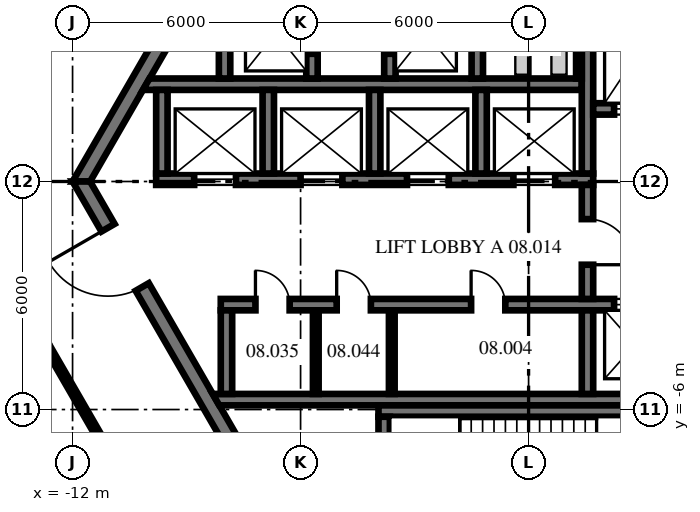
"""IFC4 building model, lengths in metres.
Left out: names, types, materials, properties, quantities, classifications, styles, units other than length and angle.
Written with IfcOpenShell. Run it as: python <this file> out.ifc"""

import sys

from ifc_helpers import new_model, si_unit, direction, frame, frame_2d, origin, place, context, subcontext, project, spatial, polyline, rectangle, outline, extrude, source, transform, mapped, element, fill, save


model = new_model("IFC4")
c1 = context("Model", 3, precision=1e-05, world=origin(), true_north=direction((0.0, 1.0)))
c2 = subcontext(c1, "Body", "Model", "MODEL_VIEW")
j1 = project(units=[si_unit("LENGTHUNIT", "METRE"), si_unit("PLANEANGLEUNIT", "RADIAN")], contexts=[c1])
p1 = place(None, origin())
s1 = spatial("IfcSite", under=j1, at=p1, CompositionType="ELEMENT")
p2 = place(p1, origin())
s2 = spatial("IfcBuilding", under=s1, at=p2, CompositionType="ELEMENT")
p3 = place(p2, frame((0.0, 0.0, 37.5)))
s3 = spatial("IfcBuildingStorey", under=s2, at=p3, CompositionType="ELEMENT", Elevation=37.5)
m1 = source(origin(), c2, "Body", "SweptSolid", [
    extrude(outline(polyline([(-0.115, -0.2), (11.885, -0.2), (11.654, 0.2), (0.115, 0.2), (-0.115, -0.2)])), origin(), (0.0, 0.0, 1.0), 4.1),
])
p4 = place(p3, frame((-5.885, 10.192, 0.0), z_axis=(0.0, 0.0, 1.0), x_axis=(-0.499996592174, -0.866027371285, 0.0)))
e1 = element("IfcWall", 1, at=p4, inside=s3, PredefinedType="SHEAR", context=c2, shape_type="MappedRepresentation", body=[
    mapped(m1, transform((0.0, 0.0, 0.0), scale=1.0)),
])
p5 = place(p4, frame((3.185, 0.0, 0.0)))
e2 = element("IfcOpeningElement", 2, at=p5, cuts=e1, PredefinedType="OPENING", context=c2, shape_type="SweptSolid", body=[
    extrude(rectangle(XDim=1.2, YDim=2.1, at=frame_2d((0.6, 1.05))), frame((0.0, 0.21, 0.0), z_axis=(0.0, -1.0, 0.0), x_axis=(1.0, 0.0, 0.0)), (0.0, 0.0, 1.0), 0.42),
])
p6 = place(p3, frame((-11.769, 0.0, 0.0), z_axis=(0.0, 0.0, 1.0), x_axis=(0.499996592174, -0.866027371285, 0.0)))
e3 = element("IfcWall", 3, at=p6, inside=s3, PredefinedType="SHEAR", context=c2, shape_type="MappedRepresentation", body=[
    mapped(m1, transform((0.0, 0.0, 0.0), scale=1.0)),
])
p7 = place(p6, frame((1.405, 0.0, 0.0)))
e4 = element("IfcOpeningElement", 4, at=p7, cuts=e3, PredefinedType="OPENING", context=c2, shape_type="SweptSolid", body=[
    extrude(rectangle(XDim=1.8, YDim=2.1, at=frame_2d((0.9, 1.05))), frame((0.0, 0.21, 0.0), z_axis=(0.0, -1.0, 0.0), x_axis=(1.0, 0.0, 0.0)), (0.0, 0.0, 1.0), 0.42),
])
p8 = place(p6, frame((7.915, 0.0, 0.0)))
e5 = element("IfcOpeningElement", 5, at=p8, cuts=e3, PredefinedType="OPENING", context=c2, shape_type="SweptSolid", body=[
    extrude(rectangle(XDim=1.2, YDim=2.1, at=frame_2d((0.6, 1.05))), frame((0.0, 0.21, 0.0), z_axis=(0.0, -1.0, 0.0), x_axis=(1.0, 0.0, 0.0)), (0.0, 0.0, 1.0), 0.42),
])
m2 = source(origin(), c2, "Body", "SweptSolid", [
    extrude(rectangle(XDim=11.5, YDim=0.3, at=frame_2d((5.75, 0.0))), origin(), (0.0, 0.0, 1.0), 4.1),
])
p9 = place(p3, frame((-9.8, 0.06, 0.0), z_axis=(0.0, 0.0, 1.0), x_axis=(1.0, 0.0, 0.0)))
e6 = element("IfcWall", 6, at=p9, inside=s3, PredefinedType="SHEAR", context=c2, shape_type="MappedRepresentation", body=[
    mapped(m2, transform((0.0, 0.0, 0.0), scale=1.0)),
])
p10 = place(p9, frame((1.0, 0.0, 0.0)))
e7 = element("IfcOpeningElement", 7, at=p10, cuts=e6, PredefinedType="OPENING", context=c2, shape_type="SweptSolid", body=[
    extrude(rectangle(XDim=1.1, YDim=2.1, at=frame_2d((0.55, 1.05))), frame((0.0, 0.16, 0.0), z_axis=(0.0, -1.0, 0.0), x_axis=(1.0, 0.0, 0.0)), (0.0, 0.0, 1.0), 0.32),
])
p11 = place(p9, frame((3.8, 0.0, 0.0)))
e8 = element("IfcOpeningElement", 8, at=p11, cuts=e6, PredefinedType="OPENING", context=c2, shape_type="SweptSolid", body=[
    extrude(rectangle(XDim=1.1, YDim=2.1, at=frame_2d((0.55, 1.05))), frame((0.0, 0.16, 0.0), z_axis=(0.0, -1.0, 0.0), x_axis=(1.0, 0.0, 0.0)), (0.0, 0.0, 1.0), 0.32),
])
p12 = place(p9, frame((6.6, 0.0, 0.0)))
e9 = element("IfcOpeningElement", 9, at=p12, cuts=e6, PredefinedType="OPENING", context=c2, shape_type="SweptSolid", body=[
    extrude(rectangle(XDim=1.1, YDim=2.1, at=frame_2d((0.55, 1.05))), frame((0.0, 0.16, 0.0), z_axis=(0.0, -1.0, 0.0), x_axis=(1.0, 0.0, 0.0)), (0.0, 0.0, 1.0), 0.32),
])
p13 = place(p9, frame((9.4, 0.0, 0.0)))
e10 = element("IfcOpeningElement", 10, at=p13, cuts=e6, PredefinedType="OPENING", context=c2, shape_type="SweptSolid", body=[
    extrude(rectangle(XDim=1.1, YDim=2.1, at=frame_2d((0.55, 1.05))), frame((0.0, 0.16, 0.0), z_axis=(0.0, -1.0, 0.0), x_axis=(1.0, 0.0, 0.0)), (0.0, 0.0, 1.0), 0.32),
])
m3 = source(origin(), c2, "Body", "SweptSolid", [
    extrude(outline(polyline([(11.2, -0.15), (-0.349, -0.15), (-0.176, 0.15), (11.2, 0.15), (11.2, -0.15)])), origin(), (0.0, 0.0, 1.0), 4.1),
])
p14 = place(p3, frame((-9.8, 2.56, 0.0), z_axis=(0.0, 0.0, 1.0), x_axis=(1.0, 0.0, 0.0)))
e11 = element("IfcWall", 11, at=p14, inside=s3, PredefinedType="SHEAR", context=c2, shape_type="MappedRepresentation", body=[
    mapped(m3, transform((0.0, 0.0, 0.0), scale=1.0)),
])
m4 = source(origin(), c2, "Body", "SweptSolid", [
    extrude(rectangle(XDim=4.45, YDim=0.3, at=frame_2d((2.225, 0.0))), origin(), (0.0, 0.0, 1.0), 4.1),
])
p15 = place(p3, frame((1.55, 0.21, 0.0), z_axis=(0.0, 0.0, 1.0), x_axis=(0.0, 1.0, 0.0)))
e12 = element("IfcWall", 12, at=p15, inside=s3, PredefinedType="SHEAR", context=c2, shape_type="MappedRepresentation", body=[
    mapped(m4, transform((0.0, 0.0, 0.0), scale=1.0)),
])
m5 = source(origin(), c2, "Body", "SweptSolid", [
    extrude(rectangle(XDim=3.0, YDim=0.3, at=frame_2d((1.5, 0.0))), origin(), (0.0, 0.0, 1.0), 4.1),
])
p16 = place(p3, frame((1.7, 1.91, 0.0), z_axis=(0.0, 0.0, 1.0), x_axis=(1.0, 0.0, 0.0)))
e13 = element("IfcWall", 13, at=p16, inside=s3, PredefinedType="SHEAR", context=c2, shape_type="MappedRepresentation", body=[
    mapped(m5, transform((0.0, 0.0, 0.0), scale=1.0)),
])
p17 = place(p16, frame((0.55, 0.0, 0.0)))
e14 = element("IfcOpeningElement", 14, at=p17, cuts=e13, PredefinedType="OPENING", context=c2, shape_type="SweptSolid", body=[
    extrude(rectangle(XDim=1.1, YDim=2.1, at=frame_2d((0.55, 1.05))), frame((0.0, 0.16, 0.0), z_axis=(0.0, -1.0, 0.0), x_axis=(1.0, 0.0, 0.0)), (0.0, 0.0, 1.0), 0.32),
])
m6 = source(origin(), c2, "Body", "SweptSolid", [
    extrude(rectangle(XDim=12.8, YDim=0.3, at=frame_2d((6.4, 0.0))), origin(), (0.0, 0.0, 1.0), 4.1),
])
p18 = place(p3, frame((-8.1, -3.24, 0.0), z_axis=(0.0, 0.0, 1.0), x_axis=(1.0, 0.0, 0.0)))
e15 = element("IfcWall", 15, at=p18, inside=s3, PredefinedType="SHEAR", context=c2, shape_type="MappedRepresentation", body=[
    mapped(m6, transform((0.0, 0.0, 0.0), scale=1.0)),
])
p19 = place(p18, frame((0.913, 0.0, 0.0)))
e16 = element("IfcOpeningElement", 16, at=p19, cuts=e15, PredefinedType="OPENING", context=c2, shape_type="SweptSolid", body=[
    extrude(rectangle(XDim=0.9, YDim=2.1, at=frame_2d((0.45, 1.05))), frame((0.0, 0.16, 0.0), z_axis=(0.0, -1.0, 0.0), x_axis=(1.0, 0.0, 0.0)), (0.0, 0.0, 1.0), 0.32),
])
p20 = place(p18, frame((3.05, 0.0, 0.0)))
e17 = element("IfcOpeningElement", 17, at=p20, cuts=e15, PredefinedType="OPENING", context=c2, shape_type="SweptSolid", body=[
    extrude(rectangle(XDim=0.9, YDim=2.1, at=frame_2d((0.45, 1.05))), frame((0.0, 0.16, 0.0), z_axis=(0.0, -1.0, 0.0), x_axis=(1.0, 0.0, 0.0)), (0.0, 0.0, 1.0), 0.32),
])
p21 = place(p18, frame((6.587, 0.0, 0.0)))
e18 = element("IfcOpeningElement", 18, at=p21, cuts=e15, PredefinedType="OPENING", context=c2, shape_type="SweptSolid", body=[
    extrude(rectangle(XDim=0.9, YDim=2.1, at=frame_2d((0.45, 1.05))), frame((0.0, 0.16, 0.0), z_axis=(0.0, -1.0, 0.0), x_axis=(1.0, 0.0, 0.0)), (0.0, 0.0, 1.0), 0.32),
])
p22 = place(p18, frame((10.35, 0.0, 0.0)))
e19 = element("IfcOpeningElement", 19, at=p22, cuts=e15, PredefinedType="OPENING", context=c2, shape_type="SweptSolid", body=[
    extrude(rectangle(XDim=1.1, YDim=2.1, at=frame_2d((0.55, 1.05))), frame((0.0, 0.16, 0.0), z_axis=(0.0, -1.0, 0.0), x_axis=(1.0, 0.0, 0.0)), (0.0, 0.0, 1.0), 0.32),
])
m7 = source(origin(), c2, "Body", "SweptSolid", [
    extrude(outline(polyline([(12.0, -0.15), (-0.04, -0.15), (-0.213, 0.15), (12.0, 0.15), (12.0, -0.15)])), origin(), (0.0, 0.0, 1.0), 4.1),
])
p23 = place(p3, frame((-8.1, -5.74, 0.0), z_axis=(0.0, 0.0, 1.0), x_axis=(1.0, 0.0, 0.0)))
e20 = element("IfcWall", 20, at=p23, inside=s3, PredefinedType="SHEAR", context=c2, shape_type="MappedRepresentation", body=[
    mapped(m7, transform((0.0, 0.0, 0.0), scale=1.0)),
])
m8 = source(origin(), c2, "Body", "SweptSolid", [
    extrude(rectangle(XDim=2.2, YDim=0.3, at=frame_2d((1.1, 0.0))), origin(), (0.0, 0.0, 1.0), 4.1),
])
p24 = place(p3, frame((-7.95, -5.59, 0.0), z_axis=(0.0, 0.0, 1.0), x_axis=(0.0, 1.0, 0.0)))
e21 = element("IfcWall", 21, at=p24, inside=s3, PredefinedType="SHEAR", context=c2, shape_type="MappedRepresentation", body=[
    mapped(m8, transform((0.0, 0.0, 0.0), scale=1.0)),
])
m9 = source(origin(), c2, "Body", "SweptSolid", [
    extrude(rectangle(XDim=2.2, YDim=0.3, at=frame_2d((1.1, 0.0))), origin(), (0.0, 0.0, 1.0), 4.1),
])
p25 = place(p3, frame((-9.65, 0.21, 0.0), z_axis=(0.0, 0.0, 1.0), x_axis=(0.0, 1.0, 0.0)))
e22 = element("IfcWall", 22, at=p25, inside=s3, PredefinedType="SHEAR", context=c2, shape_type="MappedRepresentation", body=[
    mapped(m9, transform((0.0, 0.0, 0.0), scale=1.0)),
])
p26 = place(p3, frame((1.55, -5.59, 0.0), z_axis=(0.0, 0.0, 1.0), x_axis=(0.0, 1.0, 0.0)))
e23 = element("IfcWall", 23, at=p26, inside=s3, PredefinedType="SHEAR", context=c2, shape_type="MappedRepresentation", body=[
    mapped(m8, transform((0.0, 0.0, 0.0), scale=1.0)),
])
p27 = place(p3, frame((1.55, -3.09, 0.0), z_axis=(0.0, 0.0, 1.0), x_axis=(0.0, 1.0, 0.0)))
e24 = element("IfcWall", 24, at=p27, inside=s3, PredefinedType="SHEAR", context=c2, shape_type="MappedRepresentation", body=[
    mapped(m5, transform((0.0, 0.0, 0.0), scale=1.0)),
])
p28 = place(p27, frame((0.9, 0.0, 0.0)))
e25 = element("IfcOpeningElement", 25, at=p28, cuts=e24, PredefinedType="OPENING", context=c2, shape_type="SweptSolid", body=[
    extrude(rectangle(XDim=1.2, YDim=2.1, at=frame_2d((0.6, 1.05))), frame((0.0, 0.16, 0.0), z_axis=(0.0, -1.0, 0.0), x_axis=(1.0, 0.0, 0.0)), (0.0, 0.0, 1.0), 0.32),
])
m10 = source(origin(), c2, "Body", "SweptSolid", [
    extrude(outline(polyline([(0.0, -0.15), (8.95, -0.15), (8.65, 0.15), (0.0, 0.15), (0.0, -0.15)])), origin(), (0.0, 0.0, 1.0), 4.1),
])
p29 = place(p3, frame((-3.95, -6.04, 0.0), z_axis=(0.0, 0.0, 1.0), x_axis=(1.0, 0.0, 0.0)))
e26 = element("IfcWall", 26, at=p29, inside=s3, PredefinedType="SHEAR", context=c2, shape_type="MappedRepresentation", body=[
    mapped(m10, transform((0.0, 0.0, 0.0), scale=1.0)),
])
m11 = source(origin(), c2, "Body", "SweptSolid", [
    extrude(outline(polyline([(3.8, -0.15), (-0.004, -0.15), (-0.004, 0.15), (3.8, 0.15), (3.8, -0.15)])), origin(), (0.0, 0.0, 1.0), 4.1),
])
p30 = place(p3, frame((-3.8, -9.99, 0.0), z_axis=(0.0, 0.0, 1.0), x_axis=(0.0, 1.0, 0.0)))
e27 = element("IfcWall", 27, at=p30, inside=s3, PredefinedType="SHEAR", context=c2, shape_type="MappedRepresentation", body=[
    mapped(m11, transform((0.0, 0.0, 0.0), scale=1.0)),
])
m12 = source(origin(), c2, "Body", "SweptSolid", [
    extrude(rectangle(XDim=2.4, YDim=0.3, at=frame_2d((1.2, 0.0))), origin(), (0.0, 0.0, 1.0), 4.1),
])
p31 = place(p3, frame((-8.0, 2.71, 0.0), z_axis=(0.0, 0.0, 1.0), x_axis=(0.0, 1.0, 0.0)))
e28 = element("IfcWall", 28, at=p31, inside=s3, PredefinedType="SHEAR", context=c2, shape_type="MappedRepresentation", body=[
    mapped(m12, transform((0.0, 0.0, 0.0), scale=1.0)),
])
p32 = place(p3, frame((-5.7, 2.71, 0.0), z_axis=(0.0, 0.0, 1.0), x_axis=(0.0, 1.0, 0.0)))
e29 = element("IfcWall", 29, at=p32, inside=s3, PredefinedType="SHEAR", context=c2, shape_type="MappedRepresentation", body=[
    mapped(m12, transform((0.0, 0.0, 0.0), scale=1.0)),
])
p33 = place(p32, frame((0.65, 0.0, 0.0)))
e30 = element("IfcOpeningElement", 30, at=p33, cuts=e29, PredefinedType="OPENING", context=c2, shape_type="SweptSolid", body=[
    extrude(rectangle(XDim=1.1, YDim=2.1, at=frame_2d((0.55, 1.05))), frame((0.0, 0.16, 0.0), z_axis=(0.0, -1.0, 0.0), x_axis=(1.0, 0.0, 0.0)), (0.0, 0.0, 1.0), 0.32),
])
p34 = place(p3, frame((-3.65, 2.71, 0.0), z_axis=(0.0, 0.0, 1.0), x_axis=(0.0, 1.0, 0.0)))
e31 = element("IfcWall", 31, at=p34, inside=s3, PredefinedType="SHEAR", context=c2, shape_type="MappedRepresentation", body=[
    mapped(m12, transform((0.0, 0.0, 0.0), scale=1.0)),
])
p35 = place(p34, frame((0.65, 0.0, 0.0)))
e32 = element("IfcOpeningElement", 32, at=p35, cuts=e31, PredefinedType="OPENING", context=c2, shape_type="SweptSolid", body=[
    extrude(rectangle(XDim=1.1, YDim=2.1, at=frame_2d((0.55, 1.05))), frame((0.0, 0.16, 0.0), z_axis=(0.0, -1.0, 0.0), x_axis=(1.0, 0.0, 0.0)), (0.0, 0.0, 1.0), 0.32),
])
p36 = place(p3, frame((-1.35, 2.71, 0.0), z_axis=(0.0, 0.0, 1.0), x_axis=(0.0, 1.0, 0.0)))
e33 = element("IfcWall", 33, at=p36, inside=s3, PredefinedType="SHEAR", context=c2, shape_type="MappedRepresentation", body=[
    mapped(m12, transform((0.0, 0.0, 0.0), scale=1.0)),
])
m13 = source(origin(), c2, "Body", "SweptSolid", [
    extrude(rectangle(XDim=3.18, YDim=0.15, at=frame_2d((1.59, 0.0))), origin(), (0.0, 0.0, 1.0), 4.1),
])
p37 = place(p3, frame((1.325, 2.71, 0.0), z_axis=(0.0, 0.0, 1.0), x_axis=(0.0, 1.0, 0.0)))
e34 = element("IfcWall", 34, at=p37, inside=s3, PredefinedType="PARTITIONING", context=c2, shape_type="MappedRepresentation", body=[
    mapped(m13, transform((0.0, 0.0, 0.0), scale=1.0)),
])
p38 = place(p37, frame((2.265, 0.0, 0.0)))
e35 = element("IfcOpeningElement", 35, at=p38, cuts=e34, PredefinedType="OPENING", context=c2, shape_type="SweptSolid", body=[
    extrude(rectangle(XDim=0.9, YDim=2.1, at=frame_2d((0.45, 1.05))), frame((0.0, 0.085, 0.0), z_axis=(0.0, -1.0, 0.0), x_axis=(1.0, 0.0, 0.0)), (0.0, 0.0, 1.0), 0.17),
])
for number, where, z_axis, x_axis in (
    (36, (-6.85, 0.21, 0.0), (0.0, 0.0, 1.0), (0.0, 1.0, 0.0)),
    (37, (-4.05, 0.21, 0.0), (0.0, 0.0, 1.0), (0.0, 1.0, 0.0)),
    (38, (-1.25, 0.21, 0.0), (0.0, 0.0, 1.0), (0.0, 1.0, 0.0)),
):
    element("IfcWall", number, at=place(p3, frame(where, z_axis=z_axis, x_axis=x_axis)), inside=s3, PredefinedType="SHEAR", context=c2, shape_type="MappedRepresentation", body=[
        mapped(m9, transform((0.0, 0.0, 0.0), scale=1.0)),
    ])
m14 = source(origin(), c2, "Body", "SweptSolid", [
    extrude(rectangle(XDim=2.2, YDim=0.15, at=frame_2d((1.1, 0.0))), origin(), (0.0, 0.0, 1.0), 4.1),
])
for number, where, z_axis, x_axis in (
    (39, (-5.6, -5.59, 0.0), (0.0, 0.0, 1.0), (0.0, 1.0, 0.0)),
    (40, (-3.6, -5.59, 0.0), (0.0, 0.0, 1.0), (0.0, 1.0, 0.0)),
):
    element("IfcWall", number, at=place(p3, frame(where, z_axis=z_axis, x_axis=x_axis)), inside=s3, PredefinedType="PARTITIONING", context=c2, shape_type="MappedRepresentation", body=[
        mapped(m14, transform((0.0, 0.0, 0.0), scale=1.0)),
    ])
p39 = place(p3, frame((-12.665, -4.348, 0.0), z_axis=(0.0, 0.0, 1.0), x_axis=(0.500009333805, -0.866020014843, 0.0)))
e41 = element("IfcWall", 41, at=p39, inside=s3, PredefinedType="PARTITIONING", context=c2, shape_type="SweptSolid", body=[
    extrude(rectangle(XDim=3.806, YDim=0.15, at=frame_2d((1.903, 0.0))), origin(), (0.0, 0.0, 1.0), 4.1),
])
p40 = place(p3, frame((-15.175, 0.0, 0.0), z_axis=(0.0, 0.0, 1.0), x_axis=(0.499999423938, 0.866025736374, 0.0)))
e42 = element("IfcWall", 42, at=p40, inside=s3, PredefinedType="PARTITIONING", context=c2, shape_type="SweptSolid", body=[
    extrude(rectangle(XDim=8.876, YDim=0.15, at=frame_2d((4.438, 0.0))), origin(), (0.0, 0.0, 1.0), 4.1),
])
p41 = place(p40, frame((2.037, 0.0, 0.0)))
e43 = element("IfcOpeningElement", 43, at=p41, cuts=e42, PredefinedType="OPENING", context=c2, shape_type="SweptSolid", body=[
    extrude(rectangle(XDim=0.9, YDim=2.1, at=frame_2d((0.45, 1.05))), frame((0.0, 0.085, 0.0), z_axis=(0.0, -1.0, 0.0), x_axis=(1.0, 0.0, 0.0)), (0.0, 0.0, 1.0), 0.17),
])
p42 = place(p7, frame((1.8, 0.0, 0.0), z_axis=(0.0, 0.0, 1.0), x_axis=(-1.0, 0.0, 0.0)))
e44 = element("IfcDoor", 44, at=p42, inside=s3, OperationType="DOUBLE_DOOR_DOUBLE_SWING", PredefinedType="DOOR", context=c2, shape_type="SweptSolid", body=[
    extrude(rectangle(XDim=1.8, YDim=2.1, at=frame_2d((0.9, 1.05))), frame((0.0, 0.025, 0.0), z_axis=(0.0, -1.0, 0.0), x_axis=(1.0, 0.0, 0.0)), (0.0, 0.0, 1.0), 0.05),
])
fill(e4, e44)
p43 = place(p28, frame((1.2, 0.0, 0.0), z_axis=(0.0, 0.0, 1.0), x_axis=(-1.0, 0.0, 0.0)))
e45 = element("IfcDoor", 45, at=p43, inside=s3, OperationType="SINGLE_SWING_RIGHT", PredefinedType="DOOR", context=c2, shape_type="SweptSolid", body=[
    extrude(rectangle(XDim=1.2, YDim=2.1, at=frame_2d((0.6, 1.05))), frame((0.0, 0.025, 0.0), z_axis=(0.0, -1.0, 0.0), x_axis=(1.0, 0.0, 0.0)), (0.0, 0.0, 1.0), 0.05),
])
fill(e25, e45)
p44 = place(p19, origin())
e46 = element("IfcDoor", 46, at=p44, inside=s3, OperationType="SINGLE_SWING_LEFT", PredefinedType="DOOR", context=c2, shape_type="SweptSolid", body=[
    extrude(rectangle(XDim=0.9, YDim=2.1, at=frame_2d((0.45, 1.05))), frame((0.0, 0.025, 0.0), z_axis=(0.0, -1.0, 0.0), x_axis=(1.0, 0.0, 0.0)), (0.0, 0.0, 1.0), 0.05),
])
fill(e16, e46)
p45 = place(p20, origin())
e47 = element("IfcDoor", 47, at=p45, inside=s3, OperationType="SINGLE_SWING_LEFT", PredefinedType="DOOR", context=c2, shape_type="SweptSolid", body=[
    extrude(rectangle(XDim=0.9, YDim=2.1, at=frame_2d((0.45, 1.05))), frame((0.0, 0.025, 0.0), z_axis=(0.0, -1.0, 0.0), x_axis=(1.0, 0.0, 0.0)), (0.0, 0.0, 1.0), 0.05),
])
fill(e17, e47)
p46 = place(p21, origin())
e48 = element("IfcDoor", 48, at=p46, inside=s3, OperationType="SINGLE_SWING_LEFT", PredefinedType="DOOR", context=c2, shape_type="SweptSolid", body=[
    extrude(rectangle(XDim=0.9, YDim=2.1, at=frame_2d((0.45, 1.05))), frame((0.0, 0.025, 0.0), z_axis=(0.0, -1.0, 0.0), x_axis=(1.0, 0.0, 0.0)), (0.0, 0.0, 1.0), 0.05),
])
fill(e18, e48)
p47 = place(p10, origin())
e49 = element("IfcDoor", 49, at=p47, inside=s3, OperationType="DOUBLE_DOOR_SLIDING", PredefinedType="DOOR", context=c2, shape_type="SweptSolid", body=[
    extrude(rectangle(XDim=1.1, YDim=2.1, at=frame_2d((0.55, 1.05))), frame((0.0, 0.025, 0.0), z_axis=(0.0, -1.0, 0.0), x_axis=(1.0, 0.0, 0.0)), (0.0, 0.0, 1.0), 0.05),
])
fill(e7, e49)
p48 = place(p11, origin())
e50 = element("IfcDoor", 50, at=p48, inside=s3, OperationType="DOUBLE_DOOR_SLIDING", PredefinedType="DOOR", context=c2, shape_type="SweptSolid", body=[
    extrude(rectangle(XDim=1.1, YDim=2.1, at=frame_2d((0.55, 1.05))), frame((0.0, 0.025, 0.0), z_axis=(0.0, -1.0, 0.0), x_axis=(1.0, 0.0, 0.0)), (0.0, 0.0, 1.0), 0.05),
])
fill(e8, e50)
p49 = place(p12, origin())
e51 = element("IfcDoor", 51, at=p49, inside=s3, OperationType="DOUBLE_DOOR_SLIDING", PredefinedType="DOOR", context=c2, shape_type="SweptSolid", body=[
    extrude(rectangle(XDim=1.1, YDim=2.1, at=frame_2d((0.55, 1.05))), frame((0.0, 0.025, 0.0), z_axis=(0.0, -1.0, 0.0), x_axis=(1.0, 0.0, 0.0)), (0.0, 0.0, 1.0), 0.05),
])
fill(e9, e51)
p50 = place(p13, origin())
e52 = element("IfcDoor", 52, at=p50, inside=s3, OperationType="DOUBLE_DOOR_SLIDING", PredefinedType="DOOR", context=c2, shape_type="SweptSolid", body=[
    extrude(rectangle(XDim=1.1, YDim=2.1, at=frame_2d((0.55, 1.05))), frame((0.0, 0.025, 0.0), z_axis=(0.0, -1.0, 0.0), x_axis=(1.0, 0.0, 0.0)), (0.0, 0.0, 1.0), 0.05),
])
fill(e10, e52)
p51 = place(p17, origin())
e53 = element("IfcDoor", 53, at=p51, inside=s3, OperationType="DOUBLE_DOOR_SLIDING", PredefinedType="DOOR", context=c2, shape_type="SweptSolid", body=[
    extrude(rectangle(XDim=1.1, YDim=2.1, at=frame_2d((0.55, 1.05))), frame((0.0, 0.025, 0.0), z_axis=(0.0, -1.0, 0.0), x_axis=(1.0, 0.0, 0.0)), (0.0, 0.0, 1.0), 0.05),
])
fill(e14, e53)
p52 = place(p22, origin())
e54 = element("IfcDoor", 54, at=p52, inside=s3, OperationType="DOUBLE_DOOR_SLIDING", PredefinedType="DOOR", context=c2, shape_type="SweptSolid", body=[
    extrude(rectangle(XDim=1.1, YDim=2.1, at=frame_2d((0.55, 1.05))), frame((0.0, 0.025, 0.0), z_axis=(0.0, -1.0, 0.0), x_axis=(1.0, 0.0, 0.0)), (0.0, 0.0, 1.0), 0.05),
])
fill(e19, e54)
p53 = place(p33, origin())
e55 = element("IfcDoor", 55, at=p53, inside=s3, OperationType="DOUBLE_DOOR_SLIDING", PredefinedType="DOOR", context=c2, shape_type="SweptSolid", body=[
    extrude(rectangle(XDim=1.1, YDim=2.1, at=frame_2d((0.55, 1.05))), frame((0.0, 0.025, 0.0), z_axis=(0.0, -1.0, 0.0), x_axis=(1.0, 0.0, 0.0)), (0.0, 0.0, 1.0), 0.05),
])
fill(e30, e55)
p54 = place(p35, origin())
e56 = element("IfcDoor", 56, at=p54, inside=s3, OperationType="DOUBLE_DOOR_SLIDING", PredefinedType="DOOR", context=c2, shape_type="SweptSolid", body=[
    extrude(rectangle(XDim=1.1, YDim=2.1, at=frame_2d((0.55, 1.05))), frame((0.0, 0.025, 0.0), z_axis=(0.0, -1.0, 0.0), x_axis=(1.0, 0.0, 0.0)), (0.0, 0.0, 1.0), 0.05),
])
fill(e32, e56)
save(model, sys.argv[1])
